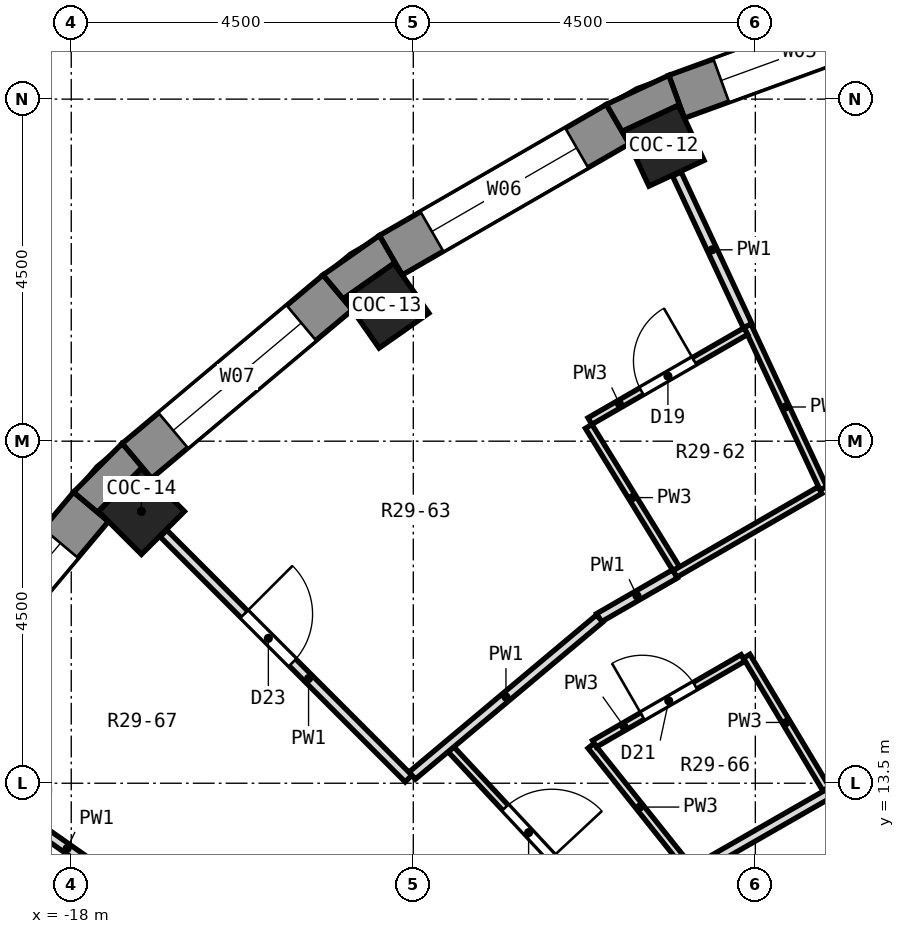
"""IFC4 building model, lengths in metres.
Left out: names, types, materials, properties, quantities, classifications, styles, units other than length and angle.
Written with IfcOpenShell. Run it as: python <this file> out.ifc"""

import sys

from ifc_helpers import new_model, si_unit, direction, frame, frame_2d, origin, origin_2d, place, context, subcontext, project, spatial, polyline, rectangle, outline, extrude, element, fill, save


model = new_model("IFC4")
c1 = context("Model", 3, precision=1e-05, world=origin(), true_north=direction((0.0, 1.0)))
c2 = subcontext(c1, "Body", "Model", "MODEL_VIEW")
j1 = project(units=[si_unit("LENGTHUNIT", "METRE"), si_unit("PLANEANGLEUNIT", "RADIAN")], contexts=[c1])
p1 = place(None, origin())
s1 = spatial("IfcSite", under=j1, at=p1, CompositionType="ELEMENT")
p2 = place(p1, origin())
s2 = spatial("IfcBuilding", under=s1, at=p2, CompositionType="ELEMENT")
p3 = place(p2, frame((0.0, 0.0, 200.4)))
s3 = spatial("IfcBuildingStorey", under=s2, at=p3, CompositionType="ELEMENT", Elevation=200.4)
for number, where, z_axis, x_axis in (
    (1, (-10.206, 21.887, 0.0), (0.0, 0.0, 1.0), (-0.423, 0.906, 0.0)),
    (2, (-13.852, 19.782, 0.0), (0.0, 0.0, 1.0), (-0.574, 0.819, 0.0)),
    (3, (-17.077, 17.077, 0.0), (0.0, 0.0, 1.0), (-0.707, 0.707, 0.0)),
):
    element("IfcColumn", number, at=place(p3, frame(where, z_axis=z_axis, x_axis=x_axis)), inside=s3, PredefinedType="COLUMN", context=c2, shape_type="SweptSolid", body=[
        extrude(rectangle(XDim=0.8, YDim=0.8, at=origin_2d()), origin(), (0.0, 0.0, 1.0), 3.3),
    ])
p4 = place(p3, frame((-6.794, 23.711, 0.0), z_axis=(0.0, 0.0, 1.0), x_axis=(-0.93968799822, -0.342032843455, 0.0)))
e4 = element("IfcWall", 4, at=p4, inside=s3, PredefinedType="SOLIDWALL", context=c2, shape_type="SweptSolid", body=[
    extrude(rectangle(XDim=3.45, YDim=0.6, at=frame_2d((1.725, 0.0))), origin(), (0.0, 0.0, 1.0), 2.85),
])
p5 = place(p4, frame((0.625, 0.0, 0.9)))
e5 = element("IfcOpeningElement", 5, at=p5, cuts=e4, PredefinedType="OPENING", context=c2, shape_type="SweptSolid", body=[
    extrude(rectangle(XDim=2.2, YDim=1.8, at=frame_2d((1.1, 0.9))), frame((0.0, 0.312, 0.0), z_axis=(0.0, -1.0, 0.0), x_axis=(1.0, 0.0, 0.0)), (0.0, 0.0, 1.0), 0.624),
])
p6 = place(p3, frame((-10.809, 22.171, 0.0), z_axis=(0.0, 0.0, 1.0), x_axis=(-0.86602648383, -0.499998129301, 0.0)))
e6 = element("IfcWall", 6, at=p6, inside=s3, PredefinedType="SOLIDWALL", context=c2, shape_type="SweptSolid", body=[
    extrude(rectangle(XDim=3.45, YDim=0.6, at=frame_2d((1.725, 0.0))), origin(), (0.0, 0.0, 1.0), 2.85),
])
p7 = place(p6, frame((0.625, 0.0, 0.9)))
e7 = element("IfcOpeningElement", 7, at=p7, cuts=e6, PredefinedType="OPENING", context=c2, shape_type="SweptSolid", body=[
    extrude(rectangle(XDim=2.2, YDim=1.8, at=frame_2d((1.1, 0.9))), frame((0.0, 0.312, 0.0), z_axis=(0.0, -1.0, 0.0), x_axis=(1.0, 0.0, 0.0)), (0.0, 0.0, 1.0), 0.624),
])
p8 = place(p3, frame((-14.494, 19.957, 0.0), z_axis=(0.0, 0.0, 1.0), x_axis=(-0.766058884809, -0.642770398358, 0.0)))
e8 = element("IfcWall", 8, at=p8, inside=s3, PredefinedType="SOLIDWALL", context=c2, shape_type="SweptSolid", body=[
    extrude(rectangle(XDim=3.449, YDim=0.6, at=frame_2d((1.725, 0.0))), origin(), (0.0, 0.0, 1.0), 2.85),
])
p9 = place(p8, frame((0.625, 0.0, 0.9)))
e9 = element("IfcOpeningElement", 9, at=p9, cuts=e8, PredefinedType="OPENING", context=c2, shape_type="SweptSolid", body=[
    extrude(rectangle(XDim=2.2, YDim=1.8, at=frame_2d((1.1, 0.9))), frame((0.0, 0.312, 0.0), z_axis=(0.0, -1.0, 0.0), x_axis=(1.0, 0.0, 0.0)), (0.0, 0.0, 1.0), 0.624),
])
p10 = place(p3, frame((-17.74, 17.137, 0.0), z_axis=(0.0, 0.0, 1.0), x_axis=(-0.642770398358, -0.766058884809, 0.0)))
e10 = element("IfcWall", 10, at=p10, inside=s3, PredefinedType="SOLIDWALL", context=c2, shape_type="SweptSolid", body=[
    extrude(rectangle(XDim=3.449, YDim=0.6, at=frame_2d((1.725, 0.0))), origin(), (0.0, 0.0, 1.0), 2.85),
])
p11 = place(p10, frame((0.625, 0.0, 0.9)))
e11 = element("IfcOpeningElement", 11, at=p11, cuts=e10, PredefinedType="OPENING", context=c2, shape_type="SweptSolid", body=[
    extrude(rectangle(XDim=2.2, YDim=1.8, at=frame_2d((1.1, 0.9))), frame((0.0, 0.312, 0.0), z_axis=(0.0, -1.0, 0.0), x_axis=(1.0, 0.0, 0.0)), (0.0, 0.0, 1.0), 0.624),
])
p12 = place(p3, origin())
e12 = element("IfcWall", 12, at=p12, inside=s3, PredefinedType="SOLIDWALL", context=c2, shape_type="SweptSolid", body=[
    extrude(outline(polyline([(-10.959, 22.431), (-10.659, 21.911), (-10.738, 22.081), (-10.013, 22.419), (-9.934, 22.249), (-10.139, 22.813), (-10.959, 22.431)])), origin(), (0.0, 0.0, 1.0), 2.85),
])
p13 = place(p3, origin())
e13 = element("IfcWall", 13, at=p13, inside=s3, PredefinedType="SOLIDWALL", context=c2, shape_type="SweptSolid", body=[
    extrude(outline(polyline([(-13.946, 20.706), (-14.687, 20.187), (-14.302, 19.727), (-14.409, 19.881), (-13.754, 20.34), (-13.646, 20.186), (-13.946, 20.706)])), origin(), (0.0, 0.0, 1.0), 2.85),
])
p14 = place(p3, origin())
e14 = element("IfcWall", 14, at=p14, inside=s3, PredefinedType="SOLIDWALL", context=c2, shape_type="SweptSolid", body=[
    extrude(outline(polyline([(-17.969, 17.33), (-17.51, 16.944), (-17.642, 17.077), (-17.077, 17.642), (-16.944, 17.51), (-17.33, 17.969), (-17.969, 17.33)])), origin(), (0.0, 0.0, 1.0), 2.85),
])
p15 = place(p3, frame((-9.103, 19.519, 0.0), z_axis=(0.0, 0.0, 1.0), x_axis=(0.422834478158, -0.906206932263, 0.0)))
e15 = element("IfcWall", 15, at=p15, inside=s3, PredefinedType="PARTITIONING", context=c2, shape_type="SweptSolid", body=[
    extrude(rectangle(XDim=2.359, YDim=0.1, at=frame_2d((1.18, 0.0))), origin(), (0.0, 0.0, 1.0), 2.85),
])
p16 = place(p3, frame((-10.033, 21.516, 0.0), z_axis=(0.0, 0.0, 1.0), x_axis=(0.422709503006, -0.906265234944, 0.0)))
e16 = element("IfcWall", 16, at=p16, inside=s3, PredefinedType="PARTITIONING", context=c2, shape_type="SweptSolid", body=[
    extrude(rectangle(XDim=2.203, YDim=0.125, at=frame_2d((1.102, 0.0))), origin(), (0.0, 0.0, 1.0), 2.85),
])
p17 = place(p3, frame((-9.115, 15.171, 0.0), z_axis=(0.0, 0.0, 1.0), x_axis=(0.514495755428, -0.857492925713, 0.0)))
e17 = element("IfcWall", 17, at=p17, inside=s3, PredefinedType="PARTITIONING", context=c2, shape_type="SweptSolid", body=[
    extrude(rectangle(XDim=2.031, YDim=0.1, at=frame_2d((1.016, 0.0))), origin(), (0.0, 0.0, 1.0), 2.85),
])
p18 = place(p3, frame((-11.193, 18.195, 0.0), z_axis=(0.0, 0.0, 1.0), x_axis=(0.524029299745, -0.851700236591, 0.0)))
e18 = element("IfcWall", 18, at=p18, inside=s3, PredefinedType="PARTITIONING", context=c2, shape_type="SweptSolid", body=[
    extrude(rectangle(XDim=2.199, YDim=0.1, at=frame_2d((1.1, 0.0))), origin(), (0.0, 0.0, 1.0), 2.85),
])
p19 = place(p3, frame((-11.162, 13.992, 0.0), z_axis=(0.0, 0.0, 1.0), x_axis=(0.62359563311, -0.781747073142, 0.0)))
e19 = element("IfcWall", 19, at=p19, inside=s3, PredefinedType="PARTITIONING", context=c2, shape_type="SweptSolid", body=[
    extrude(rectangle(XDim=2.059, YDim=0.1, at=frame_2d((1.03, 0.0))), origin(), (0.0, 0.0, 1.0), 2.85),
])
p20 = place(p3, frame((-13.004, 13.946, 0.0), z_axis=(0.0, 0.0, 1.0), x_axis=(0.681856446627, -0.731486012302, 0.0)))
e20 = element("IfcWall", 20, at=p20, inside=s3, PredefinedType="PARTITIONING", context=c2, shape_type="SweptSolid", body=[
    extrude(rectangle(XDim=2.996, YDim=0.1, at=frame_2d((1.498, 0.0))), origin(), (0.0, 0.0, 1.0), 2.85),
])
p21 = place(p20, frame((1.048, 0.0, 0.0)))
e21 = element("IfcOpeningElement", 21, at=p21, cuts=e20, PredefinedType="OPENING", context=c2, shape_type="SweptSolid", body=[
    extrude(rectangle(XDim=0.9, YDim=2.1, at=frame_2d((0.45, 1.05))), frame((0.0, 0.062, 0.0), z_axis=(0.0, -1.0, 0.0), x_axis=(1.0, 0.0, 0.0)), (0.0, 0.0, 1.0), 0.124),
])
p22 = place(p3, frame((-16.787, 16.787, 0.0), z_axis=(0.0, 0.0, 1.0), x_axis=(0.707026475293, -0.707187077961, 0.0)))
e22 = element("IfcWall", 22, at=p22, inside=s3, PredefinedType="PARTITIONING", context=c2, shape_type="SweptSolid", body=[
    extrude(rectangle(XDim=4.561, YDim=0.125, at=frame_2d((2.28, 0.0))), origin(), (0.0, 0.0, 1.0), 2.85),
])
p23 = place(p22, frame((1.502, 0.0, 0.0)))
e23 = element("IfcOpeningElement", 23, at=p23, cuts=e22, PredefinedType="OPENING", context=c2, shape_type="SweptSolid", body=[
    extrude(rectangle(XDim=0.9, YDim=2.1, at=frame_2d((0.45, 1.05))), frame((0.0, 0.074, 0.0), z_axis=(0.0, -1.0, 0.0), x_axis=(1.0, 0.0, 0.0)), (0.0, 0.0, 1.0), 0.149),
])
p24 = place(p3, frame((-19.446, 13.617, 0.0), z_axis=(0.0, 0.0, 1.0), x_axis=(0.818955929984, -0.573856414746, 0.0)))
e24 = element("IfcWall", 24, at=p24, inside=s3, PredefinedType="PARTITIONING", context=c2, shape_type="SweptSolid", body=[
    extrude(rectangle(XDim=2.203, YDim=0.125, at=frame_2d((1.102, 0.0))), origin(), (0.0, 0.0, 1.0), 2.85),
])
p25 = place(p24, frame((0.349, 0.0, 0.0)))
e25 = element("IfcOpeningElement", 25, at=p25, cuts=e24, PredefinedType="OPENING", context=c2, shape_type="SweptSolid", body=[
    extrude(rectangle(XDim=0.9, YDim=2.1, at=frame_2d((0.45, 1.05))), frame((0.0, 0.074, 0.0), z_axis=(0.0, -1.0, 0.0), x_axis=(1.0, 0.0, 0.0)), (0.0, 0.0, 1.0), 0.149),
])
p26 = place(p3, frame((-11.484, 11.385, 0.0), z_axis=(0.0, 0.0, 1.0), x_axis=(0.867290156456, 0.497802957519, 0.0)))
e26 = element("IfcWall", 26, at=p26, inside=s3, PredefinedType="PARTITIONING", context=c2, shape_type="SweptSolid", body=[
    extrude(rectangle(XDim=8.48, YDim=0.125, at=frame_2d((4.24, 0.0))), origin(), (0.0, 0.0, 1.0), 2.85),
])
p27 = place(p3, frame((-9.726, 9.627, 0.0), z_axis=(0.0, 0.0, 1.0), x_axis=(0.866011939619, 0.500023319893, 0.0)))
e27 = element("IfcWall", 27, at=p27, inside=s3, PredefinedType="PARTITIONING", context=c2, shape_type="SweptSolid", body=[
    extrude(rectangle(XDim=7.071, YDim=0.125, at=frame_2d((3.536, 0.0))), origin(), (0.0, 0.0, 1.0), 2.85),
])
p28 = place(p27, frame((3.058, 0.0, 0.0)))
e28 = element("IfcOpeningElement", 28, at=p28, cuts=e27, PredefinedType="OPENING", context=c2, shape_type="SweptSolid", body=[
    extrude(rectangle(XDim=1.0, YDim=2.1, at=frame_2d((0.5, 1.05))), frame((0.0, 0.074, 0.0), z_axis=(0.0, -1.0, 0.0), x_axis=(1.0, 0.0, 0.0)), (0.0, 0.0, 1.0), 0.149),
])
p29 = place(p3, frame((-11.117, 14.02, 0.0), z_axis=(0.0, 0.0, 1.0), x_axis=(0.866084712978, 0.49989725939, 0.0)))
e29 = element("IfcWall", 29, at=p29, inside=s3, PredefinedType="PARTITIONING", context=c2, shape_type="SweptSolid", body=[
    extrude(rectangle(XDim=2.257, YDim=0.1, at=frame_2d((1.128, 0.0))), origin(), (0.0, 0.0, 1.0), 2.85),
])
p30 = place(p29, frame((0.729, 0.0, 0.0)))
e30 = element("IfcOpeningElement", 30, at=p30, cuts=e29, PredefinedType="OPENING", context=c2, shape_type="SweptSolid", body=[
    extrude(rectangle(XDim=0.8, YDim=2.1, at=frame_2d((0.4, 1.05))), frame((0.0, 0.062, 0.0), z_axis=(0.0, -1.0, 0.0), x_axis=(1.0, 0.0, 0.0)), (0.0, 0.0, 1.0), 0.124),
])
p31 = place(p3, frame((-10.058, 16.253, 0.0), z_axis=(0.0, 0.0, 1.0), x_axis=(0.866039875853, 0.499974932805, 0.0)))
e31 = element("IfcWall", 31, at=p31, inside=s3, PredefinedType="PARTITIONING", context=c2, shape_type="SweptSolid", body=[
    extrude(rectangle(XDim=2.204, YDim=0.1, at=frame_2d((1.102, 0.0))), origin(), (0.0, 0.0, 1.0), 2.85),
])
p32 = place(p3, frame((-11.057, 15.677, 0.0), z_axis=(0.0, 0.0, 1.0), x_axis=(0.866308888763, 0.499508667843, 0.0)))
e32 = element("IfcWall", 32, at=p32, inside=s3, PredefinedType="PARTITIONING", context=c2, shape_type="SweptSolid", body=[
    extrude(rectangle(XDim=1.154, YDim=0.125, at=frame_2d((0.577, 0.0))), origin(), (0.0, 0.0, 1.0), 2.85),
])
p33 = place(p3, frame((-11.177, 18.264, 0.0), z_axis=(0.0, 0.0, 1.0), x_axis=(0.866180437728, 0.49973137714, 0.0)))
e33 = element("IfcWall", 33, at=p33, inside=s3, PredefinedType="PARTITIONING", context=c2, shape_type="SweptSolid", body=[
    extrude(rectangle(XDim=2.368, YDim=0.1, at=frame_2d((1.184, 0.0))), origin(), (0.0, 0.0, 1.0), 2.85),
])
p34 = place(p33, frame((0.785, 0.0, 0.0)))
e34 = element("IfcOpeningElement", 34, at=p34, cuts=e33, PredefinedType="OPENING", context=c2, shape_type="SweptSolid", body=[
    extrude(rectangle(XDim=0.8, YDim=2.1, at=frame_2d((0.4, 1.05))), frame((0.0, 0.062, 0.0), z_axis=(0.0, -1.0, 0.0), x_axis=(1.0, 0.0, 0.0)), (0.0, 0.0, 1.0), 0.124),
])
p35 = place(p3, frame((-13.513, 13.601, 0.0), z_axis=(0.0, 0.0, 1.0), x_axis=(0.766376010837, 0.642392255567, 0.0)))
e35 = element("IfcWall", 35, at=p35, inside=s3, PredefinedType="PARTITIONING", context=c2, shape_type="SweptSolid", body=[
    extrude(rectangle(XDim=3.216, YDim=0.125, at=frame_2d((1.608, 0.0))), origin(), (0.0, 0.0, 1.0), 2.85),
])
p36 = place(p5, origin())
e36 = element("IfcWindow", 36, at=p36, inside=s3, PartitioningType="SINGLE_PANEL", PredefinedType="WINDOW", context=c2, shape_type="SweptSolid", body=[
    extrude(rectangle(XDim=2.2, YDim=1.8, at=frame_2d((1.1, 0.9))), frame((0.0, 0.18, 0.0), z_axis=(0.0, -1.0, 0.0), x_axis=(1.0, 0.0, 0.0)), (0.0, 0.0, 1.0), 0.06),
])
fill(e5, e36)
p37 = place(p7, origin())
e37 = element("IfcWindow", 37, at=p37, inside=s3, PartitioningType="SINGLE_PANEL", PredefinedType="WINDOW", context=c2, shape_type="SweptSolid", body=[
    extrude(rectangle(XDim=2.2, YDim=1.8, at=frame_2d((1.1, 0.9))), frame((0.0, 0.18, 0.0), z_axis=(0.0, -1.0, 0.0), x_axis=(1.0, 0.0, 0.0)), (0.0, 0.0, 1.0), 0.06),
])
fill(e7, e37)
p38 = place(p9, origin())
e38 = element("IfcWindow", 38, at=p38, inside=s3, PartitioningType="SINGLE_PANEL", PredefinedType="WINDOW", context=c2, shape_type="SweptSolid", body=[
    extrude(rectangle(XDim=2.2, YDim=1.8, at=frame_2d((1.1, 0.9))), frame((0.0, 0.18, 0.0), z_axis=(0.0, -1.0, 0.0), x_axis=(1.0, 0.0, 0.0)), (0.0, 0.0, 1.0), 0.06),
])
fill(e9, e38)
p39 = place(p11, origin())
e39 = element("IfcWindow", 39, at=p39, inside=s3, PartitioningType="SINGLE_PANEL", PredefinedType="WINDOW", context=c2, shape_type="SweptSolid", body=[
    extrude(rectangle(XDim=2.2, YDim=1.8, at=frame_2d((1.1, 0.9))), frame((0.0, 0.18, 0.0), z_axis=(0.0, -1.0, 0.0), x_axis=(1.0, 0.0, 0.0)), (0.0, 0.0, 1.0), 0.06),
])
fill(e11, e39)
p40 = place(p34, origin())
e40 = element("IfcDoor", 40, at=p40, inside=s3, OperationType="SINGLE_SWING_RIGHT", PredefinedType="DOOR", context=c2, shape_type="SweptSolid", body=[
    extrude(rectangle(XDim=0.8, YDim=2.1, at=frame_2d((0.4, 1.05))), frame((0.0, 0.025, 0.0), z_axis=(0.0, -1.0, 0.0), x_axis=(1.0, 0.0, 0.0)), (0.0, 0.0, 1.0), 0.05),
])
fill(e34, e40)
p41 = place(p30, origin())
e41 = element("IfcDoor", 41, at=p41, inside=s3, OperationType="SINGLE_SWING_LEFT", PredefinedType="DOOR", context=c2, shape_type="SweptSolid", body=[
    extrude(rectangle(XDim=0.8, YDim=2.1, at=frame_2d((0.4, 1.05))), frame((0.0, 0.025, 0.0), z_axis=(0.0, -1.0, 0.0), x_axis=(1.0, 0.0, 0.0)), (0.0, 0.0, 1.0), 0.05),
])
fill(e30, e41)
p42 = place(p21, origin())
e42 = element("IfcDoor", 42, at=p42, inside=s3, OperationType="SINGLE_SWING_RIGHT", PredefinedType="DOOR", context=c2, shape_type="SweptSolid", body=[
    extrude(rectangle(XDim=0.9, YDim=2.1, at=frame_2d((0.45, 1.05))), frame((0.0, 0.025, 0.0), z_axis=(0.0, -1.0, 0.0), x_axis=(1.0, 0.0, 0.0)), (0.0, 0.0, 1.0), 0.05),
])
fill(e21, e42)
p43 = place(p23, origin())
e43 = element("IfcDoor", 43, at=p43, inside=s3, OperationType="SINGLE_SWING_LEFT", PredefinedType="DOOR", context=c2, shape_type="SweptSolid", body=[
    extrude(rectangle(XDim=0.9, YDim=2.1, at=frame_2d((0.45, 1.05))), frame((0.0, 0.025, 0.0), z_axis=(0.0, -1.0, 0.0), x_axis=(1.0, 0.0, 0.0)), (0.0, 0.0, 1.0), 0.05),
])
fill(e23, e43)
save(model, sys.argv[1])
